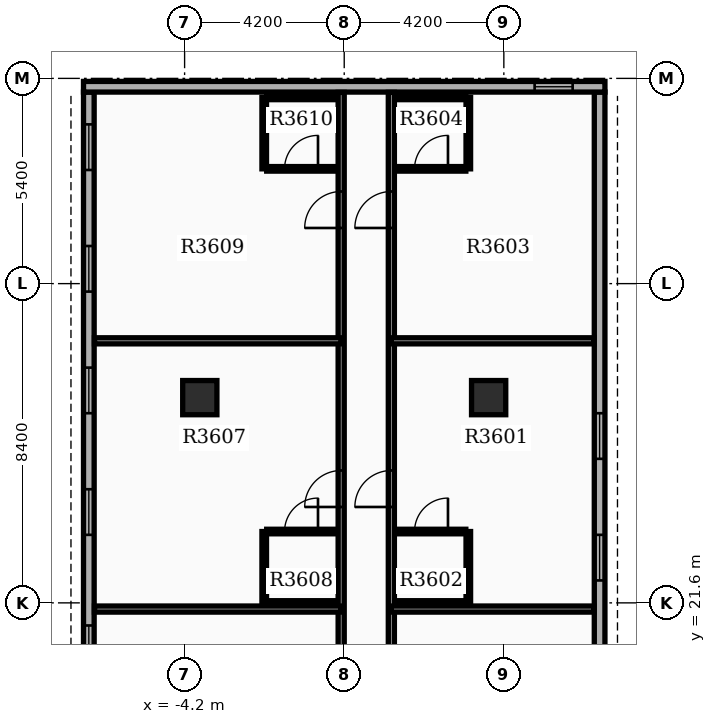
"""IFC4 building model, lengths in metres.
Left out: names, types, materials, properties, quantities, classifications, styles, units other than length and angle.
Written with IfcOpenShell. Run it as: python <this file> out.ifc"""

import sys

from ifc_helpers import new_model, si_unit, direction, frame, frame_2d, origin, origin_2d, place, context, subcontext, project, spatial, rectangle, extrude, element, fill, save


model = new_model("IFC4")
c1 = context("Model", 3, precision=1e-05, world=origin(), true_north=direction((0.0, 1.0)))
c2 = subcontext(c1, "Body", "Model", "MODEL_VIEW")
j1 = project(units=[si_unit("LENGTHUNIT", "METRE"), si_unit("PLANEANGLEUNIT", "RADIAN")], contexts=[c1])
p1 = place(None, origin())
s1 = spatial("IfcSite", under=j1, at=p1, CompositionType="ELEMENT")
p2 = place(p1, origin())
s2 = spatial("IfcBuilding", under=s1, at=p2, CompositionType="ELEMENT")
p3 = place(p2, frame((0.0, 0.0, 224.7)))
s3 = spatial("IfcBuildingStorey", under=s2, at=p3, CompositionType="ELEMENT", Elevation=224.7)
for number, where, z_axis, x_axis in (
    (1, (-3.8, 27.0, 0.0), (0.0, 0.0, 1.0), (1.0, 0.0, 0.0)),
    (2, (3.8, 27.0, 0.0), (0.0, 0.0, 1.0), (1.0, 0.0, 0.0)),
):
    element("IfcColumn", number, at=place(p3, frame(where, z_axis=z_axis, x_axis=x_axis)), inside=s3, PredefinedType="COLUMN", context=c2, shape_type="SweptSolid", body=[
        extrude(rectangle(XDim=0.9, YDim=0.9, at=origin_2d()), origin(), (0.0, 0.0, 1.0), 3.9),
    ])
p4 = place(p3, frame((6.72, 14.94, 0.0), z_axis=(0.0, 0.0, 1.0), x_axis=(0.0, 1.0, 0.0)))
e3 = element("IfcWall", 3, at=p4, inside=s3, PredefinedType="STANDARD", context=c2, shape_type="SweptSolid", body=[
    extrude(rectangle(XDim=20.1, YDim=0.28, at=frame_2d((10.05, 0.0))), origin(), (0.0, 0.0, 1.0), 3.18),
])
p5 = place(p4, frame((0.85, 0.0, 0.8)))
e4 = element("IfcOpeningElement", 4, at=p5, cuts=e3, PredefinedType="OPENING", context=c2, shape_type="SweptSolid", body=[
    extrude(rectangle(XDim=1.2, YDim=1.6, at=frame_2d((0.6, 0.8))), frame((0.0, 0.15, 0.0), z_axis=(0.0, -1.0, 0.0), x_axis=(1.0, 0.0, 0.0)), (0.0, 0.0, 1.0), 0.3),
])
p6 = place(p4, frame((4.05, 0.0, 0.8)))
e5 = element("IfcOpeningElement", 5, at=p6, cuts=e3, PredefinedType="OPENING", context=c2, shape_type="SweptSolid", body=[
    extrude(rectangle(XDim=1.2, YDim=1.6, at=frame_2d((0.6, 0.8))), frame((0.0, 0.15, 0.0), z_axis=(0.0, -1.0, 0.0), x_axis=(1.0, 0.0, 0.0)), (0.0, 0.0, 1.0), 0.3),
])
p7 = place(p4, frame((7.25, 0.0, 0.8)))
e6 = element("IfcOpeningElement", 6, at=p7, cuts=e3, PredefinedType="OPENING", context=c2, shape_type="SweptSolid", body=[
    extrude(rectangle(XDim=1.2, YDim=1.6, at=frame_2d((0.6, 0.8))), frame((0.0, 0.15, 0.0), z_axis=(0.0, -1.0, 0.0), x_axis=(1.0, 0.0, 0.0)), (0.0, 0.0, 1.0), 0.3),
])
p8 = place(p4, frame((10.45, 0.0, 0.8)))
e7 = element("IfcOpeningElement", 7, at=p8, cuts=e3, PredefinedType="OPENING", context=c2, shape_type="SweptSolid", body=[
    extrude(rectangle(XDim=1.2, YDim=1.6, at=frame_2d((0.6, 0.8))), frame((0.0, 0.15, 0.0), z_axis=(0.0, -1.0, 0.0), x_axis=(1.0, 0.0, 0.0)), (0.0, 0.0, 1.0), 0.3),
])
p9 = place(p3, frame((-6.72, 35.04, 0.0), z_axis=(0.0, 0.0, 1.0), x_axis=(0.0, -1.0, 0.0)))
e8 = element("IfcWall", 8, at=p9, inside=s3, PredefinedType="STANDARD", context=c2, shape_type="SweptSolid", body=[
    extrude(rectangle(XDim=20.1, YDim=0.28, at=frame_2d((10.05, 0.0))), origin(), (0.0, 0.0, 1.0), 3.18),
])
p10 = place(p9, frame((0.85, 0.0, 0.8)))
e9 = element("IfcOpeningElement", 9, at=p10, cuts=e8, PredefinedType="OPENING", context=c2, shape_type="SweptSolid", body=[
    extrude(rectangle(XDim=1.2, YDim=1.6, at=frame_2d((0.6, 0.8))), frame((0.0, 0.15, 0.0), z_axis=(0.0, -1.0, 0.0), x_axis=(1.0, 0.0, 0.0)), (0.0, 0.0, 1.0), 0.3),
])
p11 = place(p9, frame((4.05, 0.0, 0.8)))
e10 = element("IfcOpeningElement", 10, at=p11, cuts=e8, PredefinedType="OPENING", context=c2, shape_type="SweptSolid", body=[
    extrude(rectangle(XDim=1.2, YDim=1.6, at=frame_2d((0.6, 0.8))), frame((0.0, 0.15, 0.0), z_axis=(0.0, -1.0, 0.0), x_axis=(1.0, 0.0, 0.0)), (0.0, 0.0, 1.0), 0.3),
])
p12 = place(p9, frame((7.25, 0.0, 0.8)))
e11 = element("IfcOpeningElement", 11, at=p12, cuts=e8, PredefinedType="OPENING", context=c2, shape_type="SweptSolid", body=[
    extrude(rectangle(XDim=1.2, YDim=1.6, at=frame_2d((0.6, 0.8))), frame((0.0, 0.15, 0.0), z_axis=(0.0, -1.0, 0.0), x_axis=(1.0, 0.0, 0.0)), (0.0, 0.0, 1.0), 0.3),
])
p13 = place(p9, frame((10.45, 0.0, 0.8)))
e12 = element("IfcOpeningElement", 12, at=p13, cuts=e8, PredefinedType="OPENING", context=c2, shape_type="SweptSolid", body=[
    extrude(rectangle(XDim=1.2, YDim=1.6, at=frame_2d((0.6, 0.8))), frame((0.0, 0.15, 0.0), z_axis=(0.0, -1.0, 0.0), x_axis=(1.0, 0.0, 0.0)), (0.0, 0.0, 1.0), 0.3),
])
p14 = place(p9, frame((14.035, 0.0, 0.85)))
e13 = element("IfcOpeningElement", 13, at=p14, cuts=e8, PredefinedType="OPENING", context=c2, shape_type="SweptSolid", body=[
    extrude(rectangle(XDim=1.2, YDim=1.6, at=frame_2d((0.6, 0.8))), frame((0.0, 0.15, 0.0), z_axis=(0.0, -1.0, 0.0), x_axis=(1.0, 0.0, 0.0)), (0.0, 0.0, 1.0), 0.3),
])
p15 = place(p3, frame((6.86, 35.18, 0.0), z_axis=(0.0, 0.0, 1.0), x_axis=(-1.0, 0.0, 0.0)))
e14 = element("IfcWall", 14, at=p15, inside=s3, PredefinedType="STANDARD", context=c2, shape_type="SweptSolid", body=[
    extrude(rectangle(XDim=13.72, YDim=0.28, at=frame_2d((6.86, 0.0))), origin(), (0.0, 0.0, 1.0), 3.18),
])
p16 = place(p15, frame((0.85, 0.0, 0.85)))
e15 = element("IfcOpeningElement", 15, at=p16, cuts=e14, PredefinedType="OPENING", context=c2, shape_type="SweptSolid", body=[
    extrude(rectangle(XDim=1.0, YDim=1.5, at=frame_2d((0.5, 0.75))), frame((0.0, 0.15, 0.0), z_axis=(0.0, -1.0, 0.0), x_axis=(1.0, 0.0, 0.0)), (0.0, 0.0, 1.0), 0.3),
])
p17 = place(p3, frame((1.24, 14.85, 0.0), z_axis=(0.0, 0.0, 1.0), x_axis=(0.0, 1.0, 0.0)))
e16 = element("IfcWall", 16, at=p17, inside=s3, PredefinedType="PARTITIONING", context=c2, shape_type="SweptSolid", body=[
    extrude(rectangle(XDim=20.182, YDim=0.16, at=frame_2d((10.091, 0.0))), origin(), (0.0, 0.0, 1.0), 3.17),
])
p18 = place(p17, frame((2.639, 0.0, 0.0)))
e17 = element("IfcOpeningElement", 17, at=p18, cuts=e16, PredefinedType="OPENING", context=c2, shape_type="SweptSolid", body=[
    extrude(rectangle(XDim=0.96, YDim=2.15, at=frame_2d((0.48, 1.075))), frame((0.0, 0.09, 0.0), z_axis=(0.0, -1.0, 0.0), x_axis=(1.0, 0.0, 0.0)), (0.0, 0.0, 1.0), 0.18),
])
p19 = place(p17, frame((9.273, 0.0, 0.0)))
e18 = element("IfcOpeningElement", 18, at=p19, cuts=e16, PredefinedType="OPENING", context=c2, shape_type="SweptSolid", body=[
    extrude(rectangle(XDim=0.96, YDim=2.15, at=frame_2d((0.48, 1.075))), frame((0.0, 0.09, 0.0), z_axis=(0.0, -1.0, 0.0), x_axis=(1.0, 0.0, 0.0)), (0.0, 0.0, 1.0), 0.18),
])
p20 = place(p17, frame((16.614, 0.0, 0.0)))
e19 = element("IfcOpeningElement", 19, at=p20, cuts=e16, PredefinedType="OPENING", context=c2, shape_type="SweptSolid", body=[
    extrude(rectangle(XDim=0.96, YDim=2.15, at=frame_2d((0.48, 1.075))), frame((0.0, 0.09, 0.0), z_axis=(0.0, -1.0, 0.0), x_axis=(1.0, 0.0, 0.0)), (0.0, 0.0, 1.0), 0.18),
])
for number, where, z_axis, x_axis in (
    (20, (1.24, 21.437, 0.0), (0.0, 0.0, 1.0), (1.0, 0.0, 0.0)),
    (21, (1.24, 28.495, 0.0), (0.0, 0.0, 1.0), (1.0, 0.0, 0.0)),
):
    element("IfcWall", number, at=place(p3, frame(where, z_axis=z_axis, x_axis=x_axis)), inside=s3, PredefinedType="PARTITIONING", context=c2, shape_type="SweptSolid", body=[
        extrude(rectangle(XDim=5.332, YDim=0.16, at=frame_2d((2.666, 0.0))), origin(), (0.0, 0.0, 1.0), 3.17),
    ])
p21 = place(p3, frame((1.38, 23.477, 0.0), z_axis=(0.0, 0.0, 1.0), x_axis=(1.0, 0.0, 0.0)))
e22 = element("IfcWall", 22, at=p21, inside=s3, PredefinedType="PARTITIONING", context=c2, shape_type="SweptSolid", body=[
    extrude(rectangle(XDim=1.82, YDim=0.12, at=frame_2d((0.91, 0.0))), origin(), (0.0, 0.0, 1.0), 3.17),
])
p22 = place(p21, frame((0.47, 0.0, 0.0)))
e23 = element("IfcOpeningElement", 23, at=p22, cuts=e22, PredefinedType="OPENING", context=c2, shape_type="SweptSolid", body=[
    extrude(rectangle(XDim=0.88, YDim=2.1, at=frame_2d((0.44, 1.05))), frame((0.0, 0.07, 0.0), z_axis=(0.0, -1.0, 0.0), x_axis=(1.0, 0.0, 0.0)), (0.0, 0.0, 1.0), 0.14),
])
p23 = place(p3, frame((1.38, 21.597, 0.0), z_axis=(0.0, 0.0, 1.0), x_axis=(1.0, 0.0, 0.0)))
e24 = element("IfcWall", 24, at=p23, inside=s3, PredefinedType="PARTITIONING", context=c2, shape_type="SweptSolid", body=[
    extrude(rectangle(XDim=1.82, YDim=0.12, at=frame_2d((0.91, 0.0))), origin(), (0.0, 0.0, 1.0), 3.17),
])
p24 = place(p3, frame((3.265, 21.597, 0.0), z_axis=(0.0, 0.0, 1.0), x_axis=(0.0, 1.0, 0.0)))
e25 = element("IfcWall", 25, at=p24, inside=s3, PredefinedType="PARTITIONING", context=c2, shape_type="SweptSolid", body=[
    extrude(rectangle(XDim=1.88, YDim=0.12, at=frame_2d((0.94, 0.0))), origin(), (0.0, 0.0, 1.0), 3.17),
])
p25 = place(p3, frame((1.38, 33.02, 0.0), z_axis=(0.0, 0.0, 1.0), x_axis=(1.0, 0.0, 0.0)))
e26 = element("IfcWall", 26, at=p25, inside=s3, PredefinedType="PARTITIONING", context=c2, shape_type="SweptSolid", body=[
    extrude(rectangle(XDim=1.82, YDim=0.12, at=frame_2d((0.91, 0.0))), origin(), (0.0, 0.0, 1.0), 3.17),
])
p26 = place(p25, frame((0.47, 0.0, 0.0)))
e27 = element("IfcOpeningElement", 27, at=p26, cuts=e26, PredefinedType="OPENING", context=c2, shape_type="SweptSolid", body=[
    extrude(rectangle(XDim=0.88, YDim=2.1, at=frame_2d((0.44, 1.05))), frame((0.0, 0.07, 0.0), z_axis=(0.0, -1.0, 0.0), x_axis=(1.0, 0.0, 0.0)), (0.0, 0.0, 1.0), 0.14),
])
p27 = place(p3, frame((1.38, 34.9, 0.0), z_axis=(0.0, 0.0, 1.0), x_axis=(1.0, 0.0, 0.0)))
e28 = element("IfcWall", 28, at=p27, inside=s3, PredefinedType="PARTITIONING", context=c2, shape_type="SweptSolid", body=[
    extrude(rectangle(XDim=1.82, YDim=0.12, at=frame_2d((0.91, 0.0))), origin(), (0.0, 0.0, 1.0), 3.17),
])
p28 = place(p3, frame((3.265, 33.02, 0.0), z_axis=(0.0, 0.0, 1.0), x_axis=(0.0, 1.0, 0.0)))
e29 = element("IfcWall", 29, at=p28, inside=s3, PredefinedType="PARTITIONING", context=c2, shape_type="SweptSolid", body=[
    extrude(rectangle(XDim=1.88, YDim=0.12, at=frame_2d((0.94, 0.0))), origin(), (0.0, 0.0, 1.0), 3.17),
])
p29 = place(p3, frame((-0.08, 14.85, 0.0), z_axis=(0.0, 0.0, 1.0), x_axis=(0.0, 1.0, 0.0)))
e30 = element("IfcWall", 30, at=p29, inside=s3, PredefinedType="PARTITIONING", context=c2, shape_type="SweptSolid", body=[
    extrude(rectangle(XDim=20.182, YDim=0.16, at=frame_2d((10.091, 0.0))), origin(), (0.0, 0.0, 1.0), 3.17),
])
p30 = place(p29, frame((2.639, 0.0, 0.0)))
e31 = element("IfcOpeningElement", 31, at=p30, cuts=e30, PredefinedType="OPENING", context=c2, shape_type="SweptSolid", body=[
    extrude(rectangle(XDim=0.96, YDim=2.15, at=frame_2d((0.48, 1.075))), frame((0.0, 0.09, 0.0), z_axis=(0.0, -1.0, 0.0), x_axis=(1.0, 0.0, 0.0)), (0.0, 0.0, 1.0), 0.18),
])
p31 = place(p29, frame((9.273, 0.0, 0.0)))
e32 = element("IfcOpeningElement", 32, at=p31, cuts=e30, PredefinedType="OPENING", context=c2, shape_type="SweptSolid", body=[
    extrude(rectangle(XDim=0.96, YDim=2.15, at=frame_2d((0.48, 1.075))), frame((0.0, 0.09, 0.0), z_axis=(0.0, -1.0, 0.0), x_axis=(1.0, 0.0, 0.0)), (0.0, 0.0, 1.0), 0.18),
])
p32 = place(p29, frame((16.614, 0.0, 0.0)))
e33 = element("IfcOpeningElement", 33, at=p32, cuts=e30, PredefinedType="OPENING", context=c2, shape_type="SweptSolid", body=[
    extrude(rectangle(XDim=0.96, YDim=2.15, at=frame_2d((0.48, 1.075))), frame((0.0, 0.09, 0.0), z_axis=(0.0, -1.0, 0.0), x_axis=(1.0, 0.0, 0.0)), (0.0, 0.0, 1.0), 0.18),
])
for number, where, z_axis, x_axis in (
    (34, (-0.08, 21.437, 0.0), (0.0, 0.0, 1.0), (-1.0, 0.0, 0.0)),
    (35, (-0.08, 28.495, 0.0), (0.0, 0.0, 1.0), (-1.0, 0.0, 0.0)),
):
    element("IfcWall", number, at=place(p3, frame(where, z_axis=z_axis, x_axis=x_axis)), inside=s3, PredefinedType="PARTITIONING", context=c2, shape_type="SweptSolid", body=[
        extrude(rectangle(XDim=6.492, YDim=0.16, at=frame_2d((3.246, 0.0))), origin(), (0.0, 0.0, 1.0), 3.17),
    ])
p33 = place(p3, frame((-2.04, 23.477, 0.0), z_axis=(0.0, 0.0, 1.0), x_axis=(1.0, 0.0, 0.0)))
e36 = element("IfcWall", 36, at=p33, inside=s3, PredefinedType="PARTITIONING", context=c2, shape_type="SweptSolid", body=[
    extrude(rectangle(XDim=1.82, YDim=0.12, at=frame_2d((0.91, 0.0))), origin(), (0.0, 0.0, 1.0), 3.17),
])
p34 = place(p33, frame((0.47, 0.0, 0.0)))
e37 = element("IfcOpeningElement", 37, at=p34, cuts=e36, PredefinedType="OPENING", context=c2, shape_type="SweptSolid", body=[
    extrude(rectangle(XDim=0.88, YDim=2.1, at=frame_2d((0.44, 1.05))), frame((0.0, 0.07, 0.0), z_axis=(0.0, -1.0, 0.0), x_axis=(1.0, 0.0, 0.0)), (0.0, 0.0, 1.0), 0.14),
])
p35 = place(p3, frame((-2.04, 21.597, 0.0), z_axis=(0.0, 0.0, 1.0), x_axis=(1.0, 0.0, 0.0)))
e38 = element("IfcWall", 38, at=p35, inside=s3, PredefinedType="PARTITIONING", context=c2, shape_type="SweptSolid", body=[
    extrude(rectangle(XDim=1.82, YDim=0.12, at=frame_2d((0.91, 0.0))), origin(), (0.0, 0.0, 1.0), 3.17),
])
p36 = place(p3, frame((-2.105, 21.597, 0.0), z_axis=(0.0, 0.0, 1.0), x_axis=(0.0, 1.0, 0.0)))
e39 = element("IfcWall", 39, at=p36, inside=s3, PredefinedType="PARTITIONING", context=c2, shape_type="SweptSolid", body=[
    extrude(rectangle(XDim=1.88, YDim=0.12, at=frame_2d((0.94, 0.0))), origin(), (0.0, 0.0, 1.0), 3.17),
])
p37 = place(p3, frame((-2.04, 33.02, 0.0), z_axis=(0.0, 0.0, 1.0), x_axis=(1.0, 0.0, 0.0)))
e40 = element("IfcWall", 40, at=p37, inside=s3, PredefinedType="PARTITIONING", context=c2, shape_type="SweptSolid", body=[
    extrude(rectangle(XDim=1.82, YDim=0.12, at=frame_2d((0.91, 0.0))), origin(), (0.0, 0.0, 1.0), 3.17),
])
p38 = place(p37, frame((0.47, 0.0, 0.0)))
e41 = element("IfcOpeningElement", 41, at=p38, cuts=e40, PredefinedType="OPENING", context=c2, shape_type="SweptSolid", body=[
    extrude(rectangle(XDim=0.88, YDim=2.1, at=frame_2d((0.44, 1.05))), frame((0.0, 0.07, 0.0), z_axis=(0.0, -1.0, 0.0), x_axis=(1.0, 0.0, 0.0)), (0.0, 0.0, 1.0), 0.14),
])
p39 = place(p3, frame((-2.04, 34.9, 0.0), z_axis=(0.0, 0.0, 1.0), x_axis=(1.0, 0.0, 0.0)))
e42 = element("IfcWall", 42, at=p39, inside=s3, PredefinedType="PARTITIONING", context=c2, shape_type="SweptSolid", body=[
    extrude(rectangle(XDim=1.82, YDim=0.12, at=frame_2d((0.91, 0.0))), origin(), (0.0, 0.0, 1.0), 3.17),
])
p40 = place(p3, frame((-2.105, 33.02, 0.0), z_axis=(0.0, 0.0, 1.0), x_axis=(0.0, 1.0, 0.0)))
e43 = element("IfcWall", 43, at=p40, inside=s3, PredefinedType="PARTITIONING", context=c2, shape_type="SweptSolid", body=[
    extrude(rectangle(XDim=1.88, YDim=0.12, at=frame_2d((0.94, 0.0))), origin(), (0.0, 0.0, 1.0), 3.17),
])
p41 = place(p7, origin())
e44 = element("IfcWindow", 44, at=p41, inside=s3, PartitioningType="SINGLE_PANEL", PredefinedType="WINDOW", context=c2, shape_type="SweptSolid", body=[
    extrude(rectangle(XDim=1.2, YDim=1.6, at=frame_2d((0.6, 0.8))), frame((0.0, 0.03, 0.0), z_axis=(0.0, -1.0, 0.0), x_axis=(1.0, 0.0, 0.0)), (0.0, 0.0, 1.0), 0.06),
])
fill(e6, e44)
p42 = place(p8, origin())
e45 = element("IfcWindow", 45, at=p42, inside=s3, PartitioningType="SINGLE_PANEL", PredefinedType="WINDOW", context=c2, shape_type="SweptSolid", body=[
    extrude(rectangle(XDim=1.2, YDim=1.6, at=frame_2d((0.6, 0.8))), frame((0.0, 0.03, 0.0), z_axis=(0.0, -1.0, 0.0), x_axis=(1.0, 0.0, 0.0)), (0.0, 0.0, 1.0), 0.06),
])
fill(e7, e45)
p43 = place(p10, origin())
e46 = element("IfcWindow", 46, at=p43, inside=s3, PartitioningType="SINGLE_PANEL", PredefinedType="WINDOW", context=c2, shape_type="SweptSolid", body=[
    extrude(rectangle(XDim=1.2, YDim=1.6, at=frame_2d((0.6, 0.8))), frame((0.0, 0.03, 0.0), z_axis=(0.0, -1.0, 0.0), x_axis=(1.0, 0.0, 0.0)), (0.0, 0.0, 1.0), 0.06),
])
fill(e9, e46)
p44 = place(p11, origin())
e47 = element("IfcWindow", 47, at=p44, inside=s3, PartitioningType="SINGLE_PANEL", PredefinedType="WINDOW", context=c2, shape_type="SweptSolid", body=[
    extrude(rectangle(XDim=1.2, YDim=1.6, at=frame_2d((0.6, 0.8))), frame((0.0, 0.03, 0.0), z_axis=(0.0, -1.0, 0.0), x_axis=(1.0, 0.0, 0.0)), (0.0, 0.0, 1.0), 0.06),
])
fill(e10, e47)
p45 = place(p12, origin())
e48 = element("IfcWindow", 48, at=p45, inside=s3, PartitioningType="SINGLE_PANEL", PredefinedType="WINDOW", context=c2, shape_type="SweptSolid", body=[
    extrude(rectangle(XDim=1.2, YDim=1.6, at=frame_2d((0.6, 0.8))), frame((0.0, 0.03, 0.0), z_axis=(0.0, -1.0, 0.0), x_axis=(1.0, 0.0, 0.0)), (0.0, 0.0, 1.0), 0.06),
])
fill(e11, e48)
p46 = place(p13, origin())
e49 = element("IfcWindow", 49, at=p46, inside=s3, PartitioningType="SINGLE_PANEL", PredefinedType="WINDOW", context=c2, shape_type="SweptSolid", body=[
    extrude(rectangle(XDim=1.2, YDim=1.6, at=frame_2d((0.6, 0.8))), frame((0.0, 0.03, 0.0), z_axis=(0.0, -1.0, 0.0), x_axis=(1.0, 0.0, 0.0)), (0.0, 0.0, 1.0), 0.06),
])
fill(e12, e49)
p47 = place(p16, origin())
e50 = element("IfcWindow", 50, at=p47, inside=s3, PartitioningType="SINGLE_PANEL", PredefinedType="WINDOW", context=c2, shape_type="SweptSolid", body=[
    extrude(rectangle(XDim=1.0, YDim=1.5, at=frame_2d((0.5, 0.75))), frame((0.0, 0.03, 0.0), z_axis=(0.0, -1.0, 0.0), x_axis=(1.0, 0.0, 0.0)), (0.0, 0.0, 1.0), 0.06),
])
fill(e15, e50)
p48 = place(p14, origin())
e51 = element("IfcWindow", 51, at=p48, inside=s3, PartitioningType="SINGLE_PANEL", PredefinedType="WINDOW", context=c2, shape_type="SweptSolid", body=[
    extrude(rectangle(XDim=1.2, YDim=1.6, at=frame_2d((0.6, 0.8))), frame((0.0, 0.03, 0.0), z_axis=(0.0, -1.0, 0.0), x_axis=(1.0, 0.0, 0.0)), (0.0, 0.0, 1.0), 0.06),
])
fill(e13, e51)
p49 = place(p19, origin())
e52 = element("IfcDoor", 52, at=p49, inside=s3, OperationType="SINGLE_SWING_LEFT", PredefinedType="DOOR", context=c2, shape_type="SweptSolid", body=[
    extrude(rectangle(XDim=0.96, YDim=2.15, at=frame_2d((0.48, 1.075))), frame((0.0, 0.025, 0.0), z_axis=(0.0, -1.0, 0.0), x_axis=(1.0, 0.0, 0.0)), (0.0, 0.0, 1.0), 0.05),
])
fill(e18, e52)
p50 = place(p22, origin())
e53 = element("IfcDoor", 53, at=p50, inside=s3, OperationType="SINGLE_SWING_RIGHT", PredefinedType="DOOR", context=c2, shape_type="SweptSolid", body=[
    extrude(rectangle(XDim=0.88, YDim=2.1, at=frame_2d((0.44, 1.05))), frame((0.0, 0.025, 0.0), z_axis=(0.0, -1.0, 0.0), x_axis=(1.0, 0.0, 0.0)), (0.0, 0.0, 1.0), 0.05),
])
fill(e23, e53)
p51 = place(p20, origin())
e54 = element("IfcDoor", 54, at=p51, inside=s3, OperationType="SINGLE_SWING_LEFT", PredefinedType="DOOR", context=c2, shape_type="SweptSolid", body=[
    extrude(rectangle(XDim=0.96, YDim=2.15, at=frame_2d((0.48, 1.075))), frame((0.0, 0.025, 0.0), z_axis=(0.0, -1.0, 0.0), x_axis=(1.0, 0.0, 0.0)), (0.0, 0.0, 1.0), 0.05),
])
fill(e19, e54)
p52 = place(p26, origin())
e55 = element("IfcDoor", 55, at=p52, inside=s3, OperationType="SINGLE_SWING_RIGHT", PredefinedType="DOOR", context=c2, shape_type="SweptSolid", body=[
    extrude(rectangle(XDim=0.88, YDim=2.1, at=frame_2d((0.44, 1.05))), frame((0.0, 0.025, 0.0), z_axis=(0.0, -1.0, 0.0), x_axis=(1.0, 0.0, 0.0)), (0.0, 0.0, 1.0), 0.05),
])
fill(e27, e55)
p53 = place(p31, origin())
e56 = element("IfcDoor", 56, at=p53, inside=s3, OperationType="SINGLE_SWING_LEFT", PredefinedType="DOOR", context=c2, shape_type="SweptSolid", body=[
    extrude(rectangle(XDim=0.96, YDim=2.15, at=frame_2d((0.48, 1.075))), frame((0.0, 0.025, 0.0), z_axis=(0.0, -1.0, 0.0), x_axis=(1.0, 0.0, 0.0)), (0.0, 0.0, 1.0), 0.05),
])
fill(e32, e56)
p54 = place(p34, origin())
e57 = element("IfcDoor", 57, at=p54, inside=s3, OperationType="SINGLE_SWING_RIGHT", PredefinedType="DOOR", context=c2, shape_type="SweptSolid", body=[
    extrude(rectangle(XDim=0.88, YDim=2.1, at=frame_2d((0.44, 1.05))), frame((0.0, 0.025, 0.0), z_axis=(0.0, -1.0, 0.0), x_axis=(1.0, 0.0, 0.0)), (0.0, 0.0, 1.0), 0.05),
])
fill(e37, e57)
p55 = place(p32, origin())
e58 = element("IfcDoor", 58, at=p55, inside=s3, OperationType="SINGLE_SWING_LEFT", PredefinedType="DOOR", context=c2, shape_type="SweptSolid", body=[
    extrude(rectangle(XDim=0.96, YDim=2.15, at=frame_2d((0.48, 1.075))), frame((0.0, 0.025, 0.0), z_axis=(0.0, -1.0, 0.0), x_axis=(1.0, 0.0, 0.0)), (0.0, 0.0, 1.0), 0.05),
])
fill(e33, e58)
p56 = place(p38, origin())
e59 = element("IfcDoor", 59, at=p56, inside=s3, OperationType="SINGLE_SWING_RIGHT", PredefinedType="DOOR", context=c2, shape_type="SweptSolid", body=[
    extrude(rectangle(XDim=0.88, YDim=2.1, at=frame_2d((0.44, 1.05))), frame((0.0, 0.025, 0.0), z_axis=(0.0, -1.0, 0.0), x_axis=(1.0, 0.0, 0.0)), (0.0, 0.0, 1.0), 0.05),
])
fill(e41, e59)
save(model, sys.argv[1])
